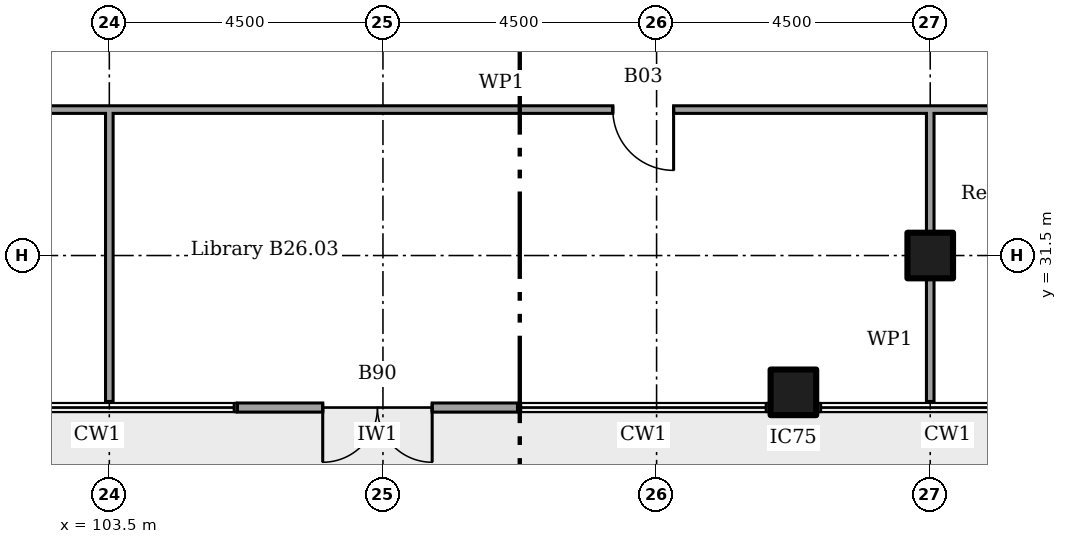
"""IFC4 building model, lengths in metres.
Left out: names, types, materials, properties, quantities, classifications, styles, units other than length and angle.
Written with IfcOpenShell. Run it as: python <this file> out.ifc"""

import sys

from ifc_helpers import new_model, si_unit, direction, frame, frame_2d, origin, origin_2d, place, context, subcontext, project, spatial, rectangle, extrude, element, fill, save


model = new_model("IFC4")
c1 = context("Model", 3, precision=1e-05, world=origin(), true_north=direction((0.0, 1.0)))
c2 = subcontext(c1, "Body", "Model", "MODEL_VIEW")
j1 = project(units=[si_unit("LENGTHUNIT", "METRE"), si_unit("PLANEANGLEUNIT", "RADIAN")], contexts=[c1])
p1 = place(None, origin())
s1 = spatial("IfcSite", under=j1, at=p1, CompositionType="ELEMENT")
p2 = place(p1, origin())
s2 = spatial("IfcBuilding", under=s1, at=p2, CompositionType="ELEMENT")
p3 = place(p2, frame((0.0, 0.0, 106.4)))
s3 = spatial("IfcBuildingStorey", under=s2, at=p3, CompositionType="ELEMENT", Elevation=106.4)
for number, where in (
    (1, (114.75, 29.25, 0.0)),
    (2, (117.0, 31.5, 0.0)),
):
    element("IfcColumn", number, at=place(p3, frame(where)), inside=s3, PredefinedType="COLUMN", context=c2, shape_type="SweptSolid", body=[
        extrude(rectangle(XDim=0.75, YDim=0.75, at=origin_2d()), origin(), (0.0, 0.0, 1.0), 3.6),
    ])
p4 = place(p3, frame((105.606, 29.0, 0.0)))
e3 = element("IfcWall", 3, at=p4, inside=s3, PredefinedType="SOLIDWALL", context=c2, shape_type="SweptSolid", body=[
    extrude(rectangle(XDim=4.606, YDim=0.15, at=frame_2d((2.303, 0.0))), origin(), (0.0, 0.0, 1.0), 3.45),
])
p5 = place(p4, frame((1.403, 0.0, 0.0)))
e4 = element("IfcOpeningElement", 4, at=p5, cuts=e3, PredefinedType="OPENING", context=c2, shape_type="SweptSolid", body=[
    extrude(rectangle(XDim=1.8, YDim=2.4, at=frame_2d((0.9, 1.2))), frame((0.0, 0.085, 0.0), z_axis=(0.0, -1.0, 0.0), x_axis=(1.0, 0.0, 0.0)), (0.0, 0.0, 1.0), 0.17),
])
p6 = place(p3, frame((99.837, 33.9, 0.0)))
e5 = element("IfcWall", 5, at=p6, inside=s3, PredefinedType="PARTITIONING", context=c2, shape_type="SweptSolid", body=[
    extrude(rectangle(XDim=20.225, YDim=0.125, at=frame_2d((10.113, 0.0))), origin(), (0.0, 0.0, 1.0), 3.45),
])
p7 = place(p6, frame((1.47, 0.0, 0.0)))
e6 = element("IfcOpeningElement", 6, at=p7, cuts=e5, PredefinedType="OPENING", context=c2, shape_type="SweptSolid", body=[
    extrude(rectangle(XDim=1.0, YDim=2.1, at=frame_2d((0.5, 1.05))), frame((0.0, 0.073, 0.0), z_axis=(0.0, -1.0, 0.0), x_axis=(1.0, 0.0, 0.0)), (0.0, 0.0, 1.0), 0.145),
])
p8 = place(p6, frame((11.942, 0.0, 0.0)))
e7 = element("IfcOpeningElement", 7, at=p8, cuts=e5, PredefinedType="OPENING", context=c2, shape_type="SweptSolid", body=[
    extrude(rectangle(XDim=1.0, YDim=2.1, at=frame_2d((0.5, 1.05))), frame((0.0, 0.073, 0.0), z_axis=(0.0, -1.0, 0.0), x_axis=(1.0, 0.0, 0.0)), (0.0, 0.0, 1.0), 0.145),
])
p9 = place(p3, frame((103.5, 29.1, 0.0), z_axis=(0.0, 0.0, 1.0), x_axis=(0.0, 1.0, 0.0)))
e8 = element("IfcWall", 8, at=p9, inside=s3, PredefinedType="PARTITIONING", context=c2, shape_type="SweptSolid", body=[
    extrude(rectangle(XDim=4.8, YDim=0.125, at=frame_2d((2.4, 0.0))), origin(), (0.0, 0.0, 1.0), 2.851),
])
for number, where, z_axis, x_axis in (
    (9, (117.0, 29.1, 0.0), (0.0, 0.0, 1.0), (0.0, 1.0, 0.0)),
    (10, (117.0, 31.875, 0.0), (0.0, 0.0, 1.0), (0.0, 1.0, 0.0)),
):
    element("IfcWall", number, at=place(p3, frame(where, z_axis=z_axis, x_axis=x_axis)), inside=s3, PredefinedType="PARTITIONING", context=c2, shape_type="SweptSolid", body=[
        extrude(rectangle(XDim=2.025, YDim=0.125, at=frame_2d((1.012, 0.0))), origin(), (0.0, 0.0, 1.0), 2.842),
    ])
p10 = place(p5, frame((1.8, 0.0, 0.0), x_axis=(-1.0, 0.0, 0.0)))
e11 = element("IfcDoor", 11, at=p10, inside=s3, OperationType="DOUBLE_DOOR_DOUBLE_SWING", PredefinedType="NOTDEFINED", context=c2, shape_type="SweptSolid", body=[
    extrude(rectangle(XDim=1.8, YDim=2.4, at=frame_2d((0.9, 1.2))), frame((0.0, 0.025, 0.0), z_axis=(0.0, -1.0, 0.0), x_axis=(1.0, 0.0, 0.0)), (0.0, 0.0, 1.0), 0.05),
])
fill(e4, e11)
p11 = place(p8, frame((1.0, 0.0, 0.0), x_axis=(-1.0, 0.0, 0.0)))
e12 = element("IfcDoor", 12, at=p11, inside=s3, OperationType="SINGLE_SWING_RIGHT", PredefinedType="DOOR", context=c2, shape_type="SweptSolid", body=[
    extrude(rectangle(XDim=1.0, YDim=2.1, at=frame_2d((0.5, 1.05))), frame((0.0, 0.025, 0.0), z_axis=(0.0, -1.0, 0.0), x_axis=(1.0, 0.0, 0.0)), (0.0, 0.0, 1.0), 0.05),
])
fill(e7, e12)
save(model, sys.argv[1])
